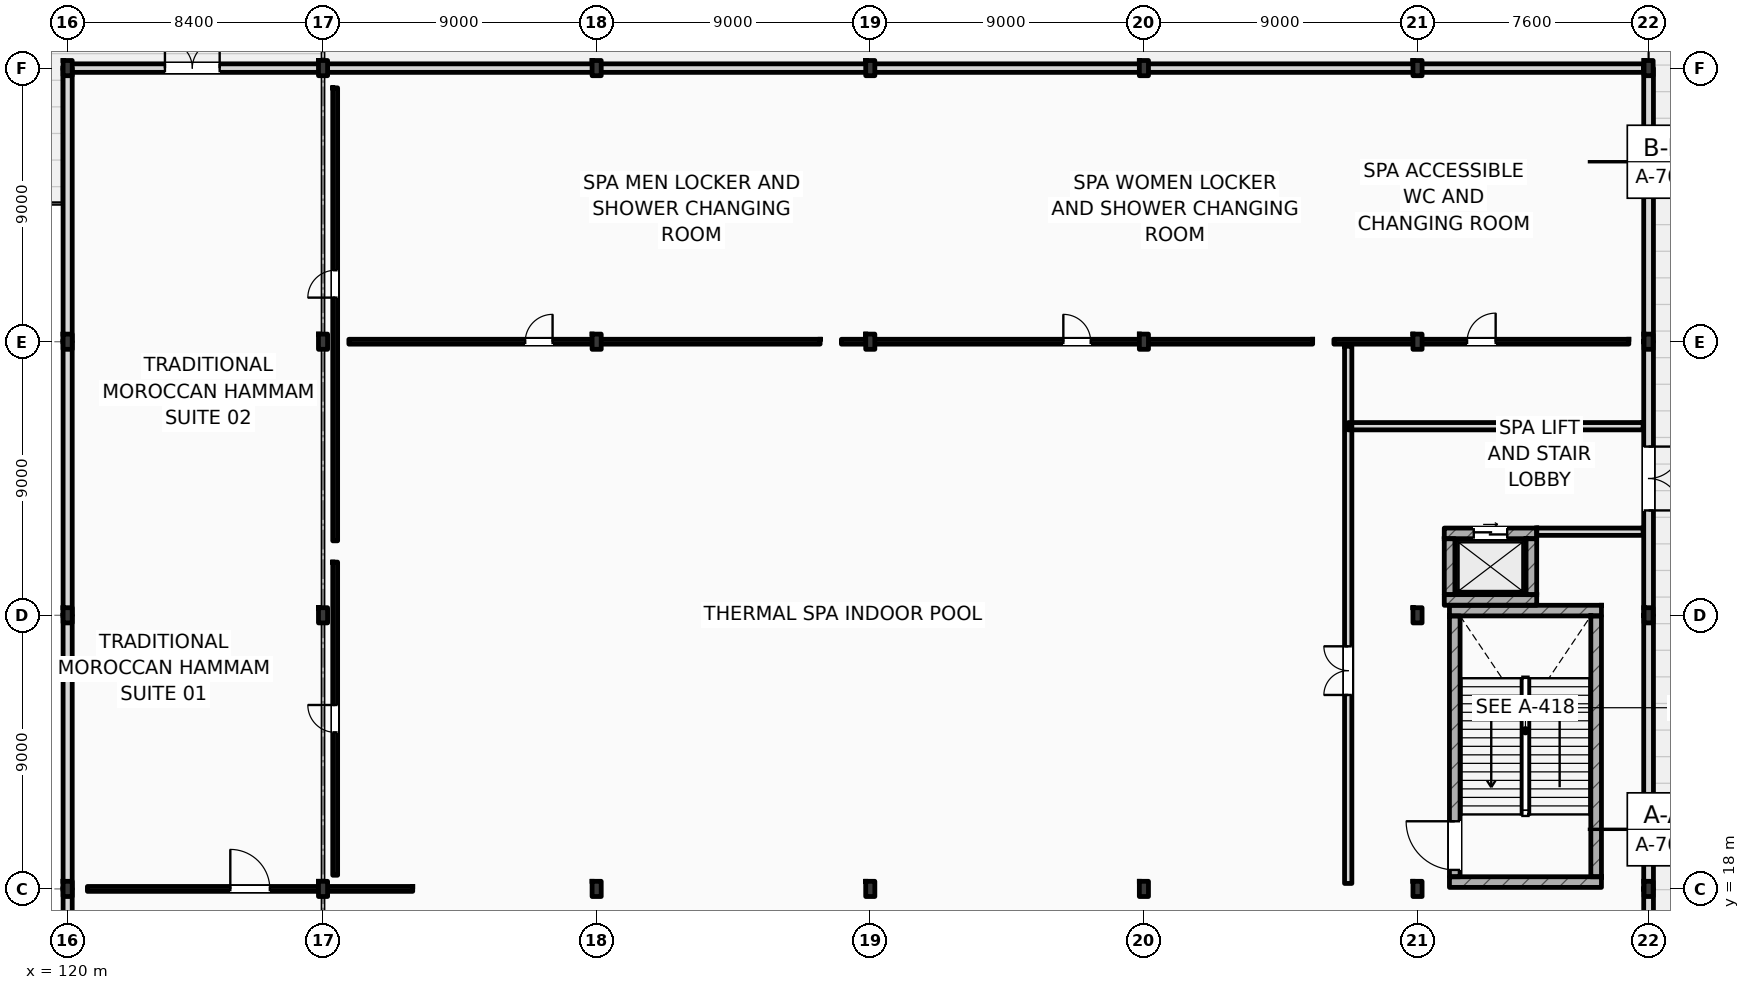
"""IFC4 building model, lengths in metres.
Left out: names, types, materials, properties, quantities, classifications, styles, units other than length and angle.
Written with IfcOpenShell. Run it as: python <this file> out.ifc"""

import sys

from ifc_helpers import new_model, si_unit, direction, frame, frame_2d, origin, origin_2d, place, context, subcontext, project, spatial, rectangle, i_section, extrude, element, fill, save


model = new_model("IFC4")
c1 = context("Model", 3, precision=1e-05, world=origin(), true_north=direction((0.0, 1.0)))
c2 = subcontext(c1, "Body", "Model", "MODEL_VIEW")
j1 = project(units=[si_unit("LENGTHUNIT", "METRE"), si_unit("PLANEANGLEUNIT", "RADIAN")], contexts=[c1])
p1 = place(None, origin())
s1 = spatial("IfcSite", under=j1, at=p1, CompositionType="ELEMENT")
p2 = place(p1, origin())
s2 = spatial("IfcBuilding", under=s1, at=p2, CompositionType="ELEMENT")
p3 = place(p2, origin())
s3 = spatial("IfcBuildingStorey", under=s2, at=p3, CompositionType="ELEMENT", Elevation=0.0)
for number, where, z_axis, x_axis in (
    (1, (120.0, 18.0, 0.0), (0.0, 0.0, 1.0), (1.0, 0.0, 0.0)),
    (2, (120.0, 27.0, 0.0), (0.0, 0.0, 1.0), (1.0, 0.0, 0.0)),
    (3, (120.0, 36.0, 0.0), (0.0, 0.0, 1.0), (1.0, 0.0, 0.0)),
    (4, (120.0, 45.0, 0.0), (0.0, 0.0, 1.0), (1.0, 0.0, 0.0)),
    (5, (128.4, 18.0, 0.0), (0.0, 0.0, 1.0), (1.0, 0.0, 0.0)),
    (6, (128.4, 27.0, 0.0), (0.0, 0.0, 1.0), (1.0, 0.0, 0.0)),
    (7, (128.4, 36.0, 0.0), (0.0, 0.0, 1.0), (1.0, 0.0, 0.0)),
    (8, (128.4, 45.0, 0.0), (0.0, 0.0, 1.0), (1.0, 0.0, 0.0)),
    (9, (137.4, 18.0, 0.0), (0.0, 0.0, 1.0), (1.0, 0.0, 0.0)),
    (10, (137.4, 36.0, 0.0), (0.0, 0.0, 1.0), (1.0, 0.0, 0.0)),
    (11, (137.4, 45.0, 0.0), (0.0, 0.0, 1.0), (1.0, 0.0, 0.0)),
    (12, (146.4, 18.0, 0.0), (0.0, 0.0, 1.0), (1.0, 0.0, 0.0)),
    (13, (146.4, 36.0, 0.0), (0.0, 0.0, 1.0), (1.0, 0.0, 0.0)),
    (14, (146.4, 45.0, 0.0), (0.0, 0.0, 1.0), (1.0, 0.0, 0.0)),
    (15, (155.4, 18.0, 0.0), (0.0, 0.0, 1.0), (1.0, 0.0, 0.0)),
    (16, (155.4, 36.0, 0.0), (0.0, 0.0, 1.0), (1.0, 0.0, 0.0)),
    (17, (155.4, 45.0, 0.0), (0.0, 0.0, 1.0), (1.0, 0.0, 0.0)),
    (18, (164.4, 18.0, 0.0), (0.0, 0.0, 1.0), (1.0, 0.0, 0.0)),
    (19, (164.4, 27.0, 0.0), (0.0, 0.0, 1.0), (1.0, 0.0, 0.0)),
    (20, (164.4, 36.0, 0.0), (0.0, 0.0, 1.0), (1.0, 0.0, 0.0)),
    (21, (164.4, 45.0, 0.0), (0.0, 0.0, 1.0), (1.0, 0.0, 0.0)),
    (22, (172.0, 18.0, 0.0), (0.0, 0.0, 1.0), (1.0, 0.0, 0.0)),
    (23, (172.0, 27.0, 0.0), (0.0, 0.0, 1.0), (1.0, 0.0, 0.0)),
    (24, (172.0, 36.0, 0.0), (0.0, 0.0, 1.0), (1.0, 0.0, 0.0)),
    (25, (172.0, 45.0, 0.0), (0.0, 0.0, 1.0), (1.0, 0.0, 0.0)),
):
    element("IfcColumn", number, at=place(p3, frame(where, z_axis=z_axis, x_axis=x_axis)), inside=s3, PredefinedType="COLUMN", context=c2, shape_type="SweptSolid", body=[
        extrude(i_section(OverallWidth=0.3, OverallDepth=0.5, WebThickness=0.014, FlangeThickness=0.028, FilletRadius=0.027, at=origin_2d()), origin(), (0.0, 0.0, 1.0), 6.0),
    ])
for number, where, z_axis, x_axis in (
    (26, (165.45, 27.155, 0.0), (0.0, 0.0, 1.0), (1.0, 0.0, 0.0)),
    (27, (165.45, 18.225, 0.0), (0.0, 0.0, 1.0), (1.0, 0.0, 0.0)),
):
    element("IfcWall", number, at=place(p3, frame(where, z_axis=z_axis, x_axis=x_axis)), inside=s3, PredefinedType="SHEAR", context=c2, shape_type="SweptSolid", body=[
        extrude(rectangle(XDim=5.0, YDim=0.35, at=frame_2d((2.5, 0.0))), origin(), (0.0, 0.0, 1.0), 6.0),
    ])
p4 = place(p3, frame((165.625, 18.4, 0.0), z_axis=(0.0, 0.0, 1.0), x_axis=(0.0, 1.0, 0.0)))
e28 = element("IfcWall", 28, at=p4, inside=s3, PredefinedType="SHEAR", context=c2, shape_type="SweptSolid", body=[
    extrude(rectangle(XDim=8.58, YDim=0.35, at=frame_2d((4.29, 0.0))), origin(), (0.0, 0.0, 1.0), 6.0),
])
p5 = place(p4, frame((0.225, 0.0, 0.0)))
e29 = element("IfcOpeningElement", 29, at=p5, cuts=e28, PredefinedType="OPENING", context=c2, shape_type="SweptSolid", body=[
    extrude(rectangle(XDim=1.6, YDim=2.2, at=frame_2d((0.8, 1.1))), frame((0.0, 0.185, 0.0), z_axis=(0.0, -1.0, 0.0), x_axis=(1.0, 0.0, 0.0)), (0.0, 0.0, 1.0), 0.37),
])
p6 = place(p3, frame((170.275, 18.4, 0.0), z_axis=(0.0, 0.0, 1.0), x_axis=(0.0, 1.0, 0.0)))
e30 = element("IfcWall", 30, at=p6, inside=s3, PredefinedType="SHEAR", context=c2, shape_type="SweptSolid", body=[
    extrude(rectangle(XDim=8.58, YDim=0.35, at=frame_2d((4.29, 0.0))), origin(), (0.0, 0.0, 1.0), 6.0),
])
p7 = place(p3, frame((120.0, 45.0, 0.0), z_axis=(0.0, 0.0, 1.0), x_axis=(1.0, 0.0, 0.0)))
e31 = element("IfcWall", 31, at=p7, inside=s3, PredefinedType="STANDARD", context=c2, shape_type="SweptSolid", body=[
    extrude(rectangle(XDim=8.4, YDim=0.28, at=frame_2d((4.2, 0.0))), origin(), (0.0, 0.0, 1.0), 5.14),
])
p8 = place(p7, frame((3.2, 0.0, 0.0)))
e32 = element("IfcOpeningElement", 32, at=p8, cuts=e31, PredefinedType="OPENING", context=c2, shape_type="SweptSolid", body=[
    extrude(rectangle(XDim=1.8, YDim=2.4, at=frame_2d((0.9, 1.2))), frame((0.0, 0.15, 0.0), z_axis=(0.0, -1.0, 0.0), x_axis=(1.0, 0.0, 0.0)), (0.0, 0.0, 1.0), 0.3),
])
for number, where, z_axis, x_axis in (
    (33, (128.4, 45.0, 0.0), (0.0, 0.0, 1.0), (1.0, 0.0, 0.0)),
    (34, (137.4, 45.0, 0.0), (0.0, 0.0, 1.0), (1.0, 0.0, 0.0)),
    (35, (146.4, 45.0, 0.0), (0.0, 0.0, 1.0), (1.0, 0.0, 0.0)),
    (36, (155.4, 45.0, 0.0), (0.0, 0.0, 1.0), (1.0, 0.0, 0.0)),
):
    element("IfcWall", number, at=place(p3, frame(where, z_axis=z_axis, x_axis=x_axis)), inside=s3, PredefinedType="STANDARD", context=c2, shape_type="SweptSolid", body=[
        extrude(rectangle(XDim=9.0, YDim=0.28, at=frame_2d((4.5, 0.0))), origin(), (0.0, 0.0, 1.0), 5.09),
    ])
p9 = place(p3, frame((164.4, 45.0, 0.0), z_axis=(0.0, 0.0, 1.0), x_axis=(1.0, 0.0, 0.0)))
e37 = element("IfcWall", 37, at=p9, inside=s3, PredefinedType="STANDARD", context=c2, shape_type="SweptSolid", body=[
    extrude(rectangle(XDim=7.6, YDim=0.28, at=frame_2d((3.8, 0.0))), origin(), (0.0, 0.0, 1.0), 5.19),
])
for number, where, z_axis, x_axis in (
    (38, (120.0, 9.0, 0.0), (0.0, 0.0, 1.0), (0.0, 1.0, 0.0)),
    (39, (120.0, 18.0, 0.0), (0.0, 0.0, 1.0), (0.0, 1.0, 0.0)),
    (40, (120.0, 27.0, 0.0), (0.0, 0.0, 1.0), (0.0, 1.0, 0.0)),
    (41, (120.0, 36.0, 0.0), (0.0, 0.0, 1.0), (0.0, 1.0, 0.0)),
):
    element("IfcWall", number, at=place(p3, frame(where, z_axis=z_axis, x_axis=x_axis)), inside=s3, PredefinedType="STANDARD", context=c2, shape_type="SweptSolid", body=[
        extrude(rectangle(XDim=9.0, YDim=0.3, at=frame_2d((4.5, 0.0))), origin(), (0.0, 0.0, 1.0), 5.2),
    ])
p10 = place(p3, frame((172.0, 9.0, 0.0), z_axis=(0.0, 0.0, 1.0), x_axis=(0.0, 1.0, 0.0)))
e42 = element("IfcWall", 42, at=p10, inside=s3, PredefinedType="STANDARD", context=c2, shape_type="SweptSolid", body=[
    extrude(rectangle(XDim=9.0, YDim=0.32, at=frame_2d((4.5, 0.0))), origin(), (0.0, 0.0, 1.0), 5.2),
])
p11 = place(p10, frame((1.25, 0.0, 0.0)))
e43 = element("IfcOpeningElement", 43, at=p11, cuts=e42, PredefinedType="OPENING", context=c2, shape_type="SweptSolid", body=[
    extrude(rectangle(XDim=6.5, YDim=3.2, at=frame_2d((3.25, 1.6))), frame((0.0, 0.17, 0.0), z_axis=(0.0, -1.0, 0.0), x_axis=(1.0, 0.0, 0.0)), (0.0, 0.0, 1.0), 0.34),
])
p12 = place(p3, frame((172.0, 18.0, 0.0), z_axis=(0.0, 0.0, 1.0), x_axis=(0.0, 1.0, 0.0)))
e44 = element("IfcWall", 44, at=p12, inside=s3, PredefinedType="STANDARD", context=c2, shape_type="SweptSolid", body=[
    extrude(rectangle(XDim=9.0, YDim=0.32, at=frame_2d((4.5, 0.0))), origin(), (0.0, 0.0, 1.0), 5.2),
])
p13 = place(p3, frame((172.0, 27.0, 0.0), z_axis=(0.0, 0.0, 1.0), x_axis=(0.0, 1.0, 0.0)))
e45 = element("IfcWall", 45, at=p13, inside=s3, PredefinedType="STANDARD", context=c2, shape_type="SweptSolid", body=[
    extrude(rectangle(XDim=9.0, YDim=0.32, at=frame_2d((4.5, 0.0))), origin(), (0.0, 0.0, 1.0), 5.2),
])
p14 = place(p13, frame((3.45, 0.0, 0.0)))
e46 = element("IfcOpeningElement", 46, at=p14, cuts=e45, PredefinedType="OPENING", context=c2, shape_type="SweptSolid", body=[
    extrude(rectangle(XDim=2.1, YDim=2.25, at=frame_2d((1.05, 1.125))), frame((0.0, 0.17, 0.0), z_axis=(0.0, -1.0, 0.0), x_axis=(1.0, 0.0, 0.0)), (0.0, 0.0, 1.0), 0.34),
])
p15 = place(p3, frame((172.0, 36.0, 0.0), z_axis=(0.0, 0.0, 1.0), x_axis=(0.0, 1.0, 0.0)))
e47 = element("IfcWall", 47, at=p15, inside=s3, PredefinedType="STANDARD", context=c2, shape_type="SweptSolid", body=[
    extrude(rectangle(XDim=9.0, YDim=0.32, at=frame_2d((4.5, 0.0))), origin(), (0.0, 0.0, 1.0), 5.2),
])
p16 = place(p3, frame((165.28, 29.695, 0.0), z_axis=(0.0, 0.0, 1.0), x_axis=(1.0, 0.0, 0.0)))
e48 = element("IfcWall", 48, at=p16, inside=s3, PredefinedType="SHEAR", context=c2, shape_type="SweptSolid", body=[
    extrude(rectangle(XDim=3.04, YDim=0.35, at=frame_2d((1.52, 0.0))), origin(), (0.0, 0.0, 1.0), 5.7),
])
p17 = place(p16, frame((0.97, 0.0, 0.0)))
e49 = element("IfcOpeningElement", 49, at=p17, cuts=e48, PredefinedType="OPENING", context=c2, shape_type="SweptSolid", body=[
    extrude(rectangle(XDim=1.1, YDim=2.2, at=frame_2d((0.55, 1.1))), frame((0.0, 0.185, 0.0), z_axis=(0.0, -1.0, 0.0), x_axis=(1.0, 0.0, 0.0)), (0.0, 0.0, 1.0), 0.37),
])
p18 = place(p3, frame((165.28, 27.505, 0.0), z_axis=(0.0, 0.0, 1.0), x_axis=(1.0, 0.0, 0.0)))
e50 = element("IfcWall", 50, at=p18, inside=s3, PredefinedType="SHEAR", context=c2, shape_type="SweptSolid", body=[
    extrude(rectangle(XDim=3.04, YDim=0.35, at=frame_2d((1.52, 0.0))), origin(), (0.0, 0.0, 1.0), 5.7),
])
for number, where, z_axis, x_axis in (
    (51, (165.455, 27.68, 0.0), (0.0, 0.0, 1.0), (0.0, 1.0, 0.0)),
    (52, (168.145, 27.68, 0.0), (0.0, 0.0, 1.0), (0.0, 1.0, 0.0)),
):
    element("IfcWall", number, at=place(p3, frame(where, z_axis=z_axis, x_axis=x_axis)), inside=s3, PredefinedType="SHEAR", context=c2, shape_type="SweptSolid", body=[
        extrude(rectangle(XDim=1.84, YDim=0.35, at=frame_2d((0.92, 0.0))), origin(), (0.0, 0.0, 1.0), 5.7),
    ])
p19 = place(p3, frame((128.8, 18.45, 0.0), z_axis=(0.0, 0.0, 1.0), x_axis=(0.0, 1.0, 0.0)))
e53 = element("IfcWall", 53, at=p19, inside=s3, PredefinedType="PARTITIONING", context=c2, shape_type="SweptSolid", body=[
    extrude(rectangle(XDim=10.3, YDim=0.16, at=frame_2d((5.15, 0.0))), origin(), (0.0, 0.0, 1.0), 5.7),
])
p20 = place(p19, frame((4.7, 0.0, 0.0)))
e54 = element("IfcOpeningElement", 54, at=p20, cuts=e53, PredefinedType="OPENING", context=c2, shape_type="SweptSolid", body=[
    extrude(rectangle(XDim=0.9, YDim=2.1, at=frame_2d((0.45, 1.05))), frame((0.0, 0.09, 0.0), z_axis=(0.0, -1.0, 0.0), x_axis=(1.0, 0.0, 0.0)), (0.0, 0.0, 1.0), 0.18),
])
p21 = place(p3, frame((128.8, 29.45, 0.0), z_axis=(0.0, 0.0, 1.0), x_axis=(0.0, 1.0, 0.0)))
e55 = element("IfcWall", 55, at=p21, inside=s3, PredefinedType="PARTITIONING", context=c2, shape_type="SweptSolid", body=[
    extrude(rectangle(XDim=14.9, YDim=0.16, at=frame_2d((7.45, 0.0))), origin(), (0.0, 0.0, 1.0), 5.7),
])
p22 = place(p21, frame((8.0, 0.0, 0.0)))
e56 = element("IfcOpeningElement", 56, at=p22, cuts=e55, PredefinedType="OPENING", context=c2, shape_type="SweptSolid", body=[
    extrude(rectangle(XDim=0.9, YDim=2.1, at=frame_2d((0.45, 1.05))), frame((0.0, 0.09, 0.0), z_axis=(0.0, -1.0, 0.0), x_axis=(1.0, 0.0, 0.0)), (0.0, 0.0, 1.0), 0.18),
])
p23 = place(p3, frame((129.25, 36.0, 0.0), z_axis=(0.0, 0.0, 1.0), x_axis=(1.0, 0.0, 0.0)))
e57 = element("IfcWall", 57, at=p23, inside=s3, PredefinedType="PARTITIONING", context=c2, shape_type="SweptSolid", body=[
    extrude(rectangle(XDim=15.5, YDim=0.16, at=frame_2d((7.75, 0.0))), origin(), (0.0, 0.0, 1.0), 5.09),
])
p24 = place(p23, frame((5.8, 0.0, 0.0)))
e58 = element("IfcOpeningElement", 58, at=p24, cuts=e57, PredefinedType="OPENING", context=c2, shape_type="SweptSolid", body=[
    extrude(rectangle(XDim=0.9, YDim=2.1, at=frame_2d((0.45, 1.05))), frame((0.0, 0.09, 0.0), z_axis=(0.0, -1.0, 0.0), x_axis=(1.0, 0.0, 0.0)), (0.0, 0.0, 1.0), 0.18),
])
p25 = place(p3, frame((145.45, 36.0, 0.0), z_axis=(0.0, 0.0, 1.0), x_axis=(1.0, 0.0, 0.0)))
e59 = element("IfcWall", 59, at=p25, inside=s3, PredefinedType="PARTITIONING", context=c2, shape_type="SweptSolid", body=[
    extrude(rectangle(XDim=15.5, YDim=0.16, at=frame_2d((7.75, 0.0))), origin(), (0.0, 0.0, 1.0), 5.09),
])
p26 = place(p25, frame((7.3, 0.0, 0.0)))
e60 = element("IfcOpeningElement", 60, at=p26, cuts=e59, PredefinedType="OPENING", context=c2, shape_type="SweptSolid", body=[
    extrude(rectangle(XDim=0.9, YDim=2.1, at=frame_2d((0.45, 1.05))), frame((0.0, 0.09, 0.0), z_axis=(0.0, -1.0, 0.0), x_axis=(1.0, 0.0, 0.0)), (0.0, 0.0, 1.0), 0.18),
])
p27 = place(p3, frame((161.65, 36.0, 0.0), z_axis=(0.0, 0.0, 1.0), x_axis=(1.0, 0.0, 0.0)))
e61 = element("IfcWall", 61, at=p27, inside=s3, PredefinedType="PARTITIONING", context=c2, shape_type="SweptSolid", body=[
    extrude(rectangle(XDim=9.7, YDim=0.16, at=frame_2d((4.85, 0.0))), origin(), (0.0, 0.0, 1.0), 5.09),
])
p28 = place(p27, frame((4.38, 0.0, 0.0)))
e62 = element("IfcOpeningElement", 62, at=p28, cuts=e61, PredefinedType="OPENING", context=c2, shape_type="SweptSolid", body=[
    extrude(rectangle(XDim=0.94, YDim=2.15, at=frame_2d((0.47, 1.075))), frame((0.0, 0.09, 0.0), z_axis=(0.0, -1.0, 0.0), x_axis=(1.0, 0.0, 0.0)), (0.0, 0.0, 1.0), 0.18),
])
p29 = place(p3, frame((120.65, 18.0, 0.0), z_axis=(0.0, 0.0, 1.0), x_axis=(1.0, 0.0, 0.0)))
e63 = element("IfcWall", 63, at=p29, inside=s3, PredefinedType="PARTITIONING", context=c2, shape_type="SweptSolid", body=[
    extrude(rectangle(XDim=10.7, YDim=0.16, at=frame_2d((5.35, 0.0))), origin(), (0.0, 0.0, 1.0), 5.09),
])
p30 = place(p29, frame((4.7, 0.0, 0.0)))
e64 = element("IfcOpeningElement", 64, at=p30, cuts=e63, PredefinedType="OPENING", context=c2, shape_type="SweptSolid", body=[
    extrude(rectangle(XDim=1.3, YDim=2.2, at=frame_2d((0.65, 1.1))), frame((0.0, 0.09, 0.0), z_axis=(0.0, -1.0, 0.0), x_axis=(1.0, 0.0, 0.0)), (0.0, 0.0, 1.0), 0.18),
])
p31 = place(p3, frame((162.12, 18.18, 0.0), z_axis=(0.0, 0.0, 1.0), x_axis=(0.0, 1.0, 0.0)))
e65 = element("IfcWall", 65, at=p31, inside=s3, PredefinedType="STANDARD", context=c2, shape_type="SweptSolid", body=[
    extrude(rectangle(XDim=17.67, YDim=0.24, at=frame_2d((8.835, 0.0))), origin(), (0.0, 0.0, 1.0), 5.7),
])
p32 = place(p31, frame((6.2, 0.0, 0.0)))
e66 = element("IfcOpeningElement", 66, at=p32, cuts=e65, PredefinedType="OPENING", context=c2, shape_type="SweptSolid", body=[
    extrude(rectangle(XDim=1.6, YDim=2.2, at=frame_2d((0.8, 1.1))), frame((0.0, 0.13, 0.0), z_axis=(0.0, -1.0, 0.0), x_axis=(1.0, 0.0, 0.0)), (0.0, 0.0, 1.0), 0.26),
])
p33 = place(p3, frame((162.12, 33.22, 0.0), z_axis=(0.0, 0.0, 1.0), x_axis=(1.0, 0.0, 0.0)))
e67 = element("IfcWall", 67, at=p33, inside=s3, PredefinedType="STANDARD", context=c2, shape_type="SweptSolid", body=[
    extrude(rectangle(XDim=9.7, YDim=0.24, at=frame_2d((4.85, 0.0))), origin(), (0.0, 0.0, 1.0), 5.7),
])
p34 = place(p3, frame((168.32, 29.75, 0.0), z_axis=(0.0, 0.0, 1.0), x_axis=(1.0, 0.0, 0.0)))
e68 = element("IfcWall", 68, at=p34, inside=s3, PredefinedType="STANDARD", context=c2, shape_type="SweptSolid", body=[
    extrude(rectangle(XDim=3.5, YDim=0.24, at=frame_2d((1.75, 0.0))), origin(), (0.0, 0.0, 1.0), 5.7),
])
p35 = place(p8, origin())
e69 = element("IfcDoor", 69, at=p35, inside=s3, OperationType="DOUBLE_SWING_LEFT", PredefinedType="DOOR", context=c2, shape_type="SweptSolid", body=[
    extrude(rectangle(XDim=1.8, YDim=2.4, at=frame_2d((0.9, 1.2))), frame((0.0, 0.025, 0.0), z_axis=(0.0, -1.0, 0.0), x_axis=(1.0, 0.0, 0.0)), (0.0, 0.0, 1.0), 0.05),
])
fill(e32, e69)
p36 = place(p14, frame((2.1, 0.0, 0.0), z_axis=(0.0, 0.0, 1.0), x_axis=(-1.0, 0.0, 0.0)))
e70 = element("IfcDoor", 70, at=p36, inside=s3, OperationType="DOUBLE_SWING_LEFT", PredefinedType="DOOR", context=c2, shape_type="SweptSolid", body=[
    extrude(rectangle(XDim=2.1, YDim=2.25, at=frame_2d((1.05, 1.125))), frame((0.0, 0.025, 0.0), z_axis=(0.0, -1.0, 0.0), x_axis=(1.0, 0.0, 0.0)), (0.0, 0.0, 1.0), 0.05),
])
fill(e46, e70)
p37 = place(p5, origin())
e71 = element("IfcDoor", 71, at=p37, inside=s3, OperationType="SINGLE_SWING_RIGHT", PredefinedType="DOOR", context=c2, shape_type="SweptSolid", body=[
    extrude(rectangle(XDim=1.6, YDim=2.2, at=frame_2d((0.8, 1.1))), frame((0.0, 0.025, 0.0), z_axis=(0.0, -1.0, 0.0), x_axis=(1.0, 0.0, 0.0)), (0.0, 0.0, 1.0), 0.05),
])
fill(e29, e71)
p38 = place(p17, origin())
e72 = element("IfcDoor", 72, at=p38, inside=s3, OperationType="SLIDING_TO_LEFT", PredefinedType="DOOR", context=c2, shape_type="SweptSolid", body=[
    extrude(rectangle(XDim=1.1, YDim=2.2, at=frame_2d((0.55, 1.1))), frame((0.0, 0.025, 0.0), z_axis=(0.0, -1.0, 0.0), x_axis=(1.0, 0.0, 0.0)), (0.0, 0.0, 1.0), 0.05),
])
fill(e49, e72)
p39 = place(p20, origin())
e73 = element("IfcDoor", 73, at=p39, inside=s3, OperationType="SINGLE_SWING_RIGHT", PredefinedType="DOOR", context=c2, shape_type="SweptSolid", body=[
    extrude(rectangle(XDim=0.9, YDim=2.1, at=frame_2d((0.45, 1.05))), frame((0.0, 0.025, 0.0), z_axis=(0.0, -1.0, 0.0), x_axis=(1.0, 0.0, 0.0)), (0.0, 0.0, 1.0), 0.05),
])
fill(e54, e73)
p40 = place(p22, origin())
e74 = element("IfcDoor", 74, at=p40, inside=s3, OperationType="SINGLE_SWING_LEFT", PredefinedType="DOOR", context=c2, shape_type="SweptSolid", body=[
    extrude(rectangle(XDim=0.9, YDim=2.1, at=frame_2d((0.45, 1.05))), frame((0.0, 0.025, 0.0), z_axis=(0.0, -1.0, 0.0), x_axis=(1.0, 0.0, 0.0)), (0.0, 0.0, 1.0), 0.05),
])
fill(e56, e74)
p41 = place(p24, origin())
e75 = element("IfcDoor", 75, at=p41, inside=s3, OperationType="SINGLE_SWING_RIGHT", PredefinedType="DOOR", context=c2, shape_type="SweptSolid", body=[
    extrude(rectangle(XDim=0.9, YDim=2.1, at=frame_2d((0.45, 1.05))), frame((0.0, 0.025, 0.0), z_axis=(0.0, -1.0, 0.0), x_axis=(1.0, 0.0, 0.0)), (0.0, 0.0, 1.0), 0.05),
])
fill(e58, e75)
p42 = place(p26, origin())
e76 = element("IfcDoor", 76, at=p42, inside=s3, OperationType="SINGLE_SWING_LEFT", PredefinedType="DOOR", context=c2, shape_type="SweptSolid", body=[
    extrude(rectangle(XDim=0.9, YDim=2.1, at=frame_2d((0.45, 1.05))), frame((0.0, 0.025, 0.0), z_axis=(0.0, -1.0, 0.0), x_axis=(1.0, 0.0, 0.0)), (0.0, 0.0, 1.0), 0.05),
])
fill(e60, e76)
p43 = place(p28, origin())
e77 = element("IfcDoor", 77, at=p43, inside=s3, OperationType="SINGLE_SWING_RIGHT", PredefinedType="DOOR", context=c2, shape_type="SweptSolid", body=[
    extrude(rectangle(XDim=0.94, YDim=2.15, at=frame_2d((0.47, 1.075))), frame((0.0, 0.025, 0.0), z_axis=(0.0, -1.0, 0.0), x_axis=(1.0, 0.0, 0.0)), (0.0, 0.0, 1.0), 0.05),
])
fill(e62, e77)
p44 = place(p30, origin())
e78 = element("IfcDoor", 78, at=p44, inside=s3, OperationType="SINGLE_SWING_LEFT", PredefinedType="DOOR", context=c2, shape_type="SweptSolid", body=[
    extrude(rectangle(XDim=1.3, YDim=2.2, at=frame_2d((0.65, 1.1))), frame((0.0, 0.025, 0.0), z_axis=(0.0, -1.0, 0.0), x_axis=(1.0, 0.0, 0.0)), (0.0, 0.0, 1.0), 0.05),
])
fill(e64, e78)
p45 = place(p32, origin())
e79 = element("IfcDoor", 79, at=p45, inside=s3, OperationType="DOUBLE_SWING_LEFT", PredefinedType="DOOR", context=c2, shape_type="SweptSolid", body=[
    extrude(rectangle(XDim=1.6, YDim=2.2, at=frame_2d((0.8, 1.1))), frame((0.0, 0.025, 0.0), z_axis=(0.0, -1.0, 0.0), x_axis=(1.0, 0.0, 0.0)), (0.0, 0.0, 1.0), 0.05),
])
fill(e66, e79)
save(model, sys.argv[1])
